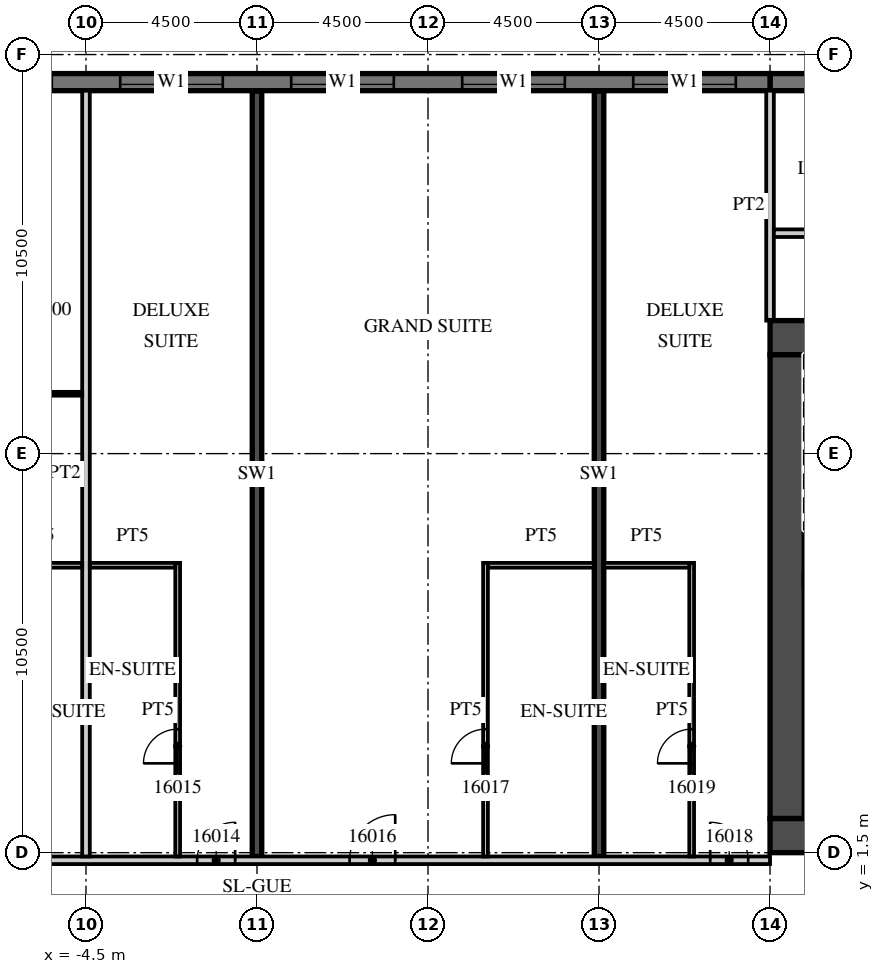
"""IFC4 building model, lengths in metres.
Left out: names, types, materials, properties, quantities, classifications, styles, units other than length and angle.
Written with IfcOpenShell. Run it as: python <this file> out.ifc"""

import sys

from ifc_helpers import new_model, si_unit, direction, frame, frame_2d, origin, place, context, subcontext, project, spatial, rectangle, extrude, element, fill, save


model = new_model("IFC4")
c1 = context("Model", 3, precision=1e-05, world=origin(), true_north=direction((0.0, 1.0)))
c2 = subcontext(c1, "Body", "Model", "MODEL_VIEW")
j1 = project(units=[si_unit("LENGTHUNIT", "METRE"), si_unit("PLANEANGLEUNIT", "RADIAN")], contexts=[c1])
p1 = place(None, origin())
s1 = spatial("IfcSite", under=j1, at=p1, CompositionType="ELEMENT")
p2 = place(p1, origin())
s2 = spatial("IfcBuilding", under=s1, at=p2, CompositionType="ELEMENT")
p3 = place(p2, frame((0.0, 0.0, 83.1)))
s3 = spatial("IfcBuildingStorey", under=s2, at=p3, CompositionType="ELEMENT", Elevation=83.1)
for number, where, z_axis, x_axis in (
    (1, (0.0, 1.4, 0.0), (0.0, 0.0, 1.0), (0.0, 1.0, 0.0)),
    (2, (9.0, 1.4, 0.0), (0.0, 0.0, 1.0), (0.0, 1.0, 0.0)),
):
    element("IfcWall", number, at=place(p3, frame(where, z_axis=z_axis, x_axis=x_axis)), inside=s3, PredefinedType="SHEAR", context=c2, shape_type="SweptSolid", body=[
        extrude(rectangle(XDim=20.14, YDim=0.25, at=frame_2d((10.07, 0.0))), origin(), (0.0, 0.0, 1.0), 3.3),
    ])
p4 = place(p3, frame((31.5, 21.775, 0.0), z_axis=(0.0, 0.0, 1.0), x_axis=(-1.0, 0.0, 0.0)))
e3 = element("IfcWall", 3, at=p4, inside=s3, PredefinedType="SOLIDWALL", context=c2, shape_type="SweptSolid", body=[
    extrude(rectangle(XDim=18.0, YDim=0.45, at=frame_2d((9.0, 0.0))), origin(), (0.0, 0.0, 1.0), 3.02),
])
p5 = place(p3, frame((13.5, 21.775, 0.0), z_axis=(0.0, 0.0, 1.0), x_axis=(-1.0, 0.0, 0.0)))
e4 = element("IfcWall", 4, at=p5, inside=s3, PredefinedType="SOLIDWALL", context=c2, shape_type="SweptSolid", body=[
    extrude(rectangle(XDim=54.5, YDim=0.45, at=frame_2d((27.25, 0.0))), origin(), (0.0, 0.0, 1.0), 3.02),
])
p6 = place(p5, frame((0.9, 0.0, 0.45)))
e5 = element("IfcOpeningElement", 5, at=p6, cuts=e4, PredefinedType="OPENING", context=c2, shape_type="SweptSolid", body=[
    extrude(rectangle(XDim=2.7, YDim=2.25, at=frame_2d((1.35, 1.125))), frame((0.0, 0.235, 0.0), z_axis=(0.0, -1.0, 0.0), x_axis=(1.0, 0.0, 0.0)), (0.0, 0.0, 1.0), 0.47),
])
p7 = place(p5, frame((5.4, 0.0, 0.45)))
e6 = element("IfcOpeningElement", 6, at=p7, cuts=e4, PredefinedType="OPENING", context=c2, shape_type="SweptSolid", body=[
    extrude(rectangle(XDim=2.7, YDim=2.25, at=frame_2d((1.35, 1.125))), frame((0.0, 0.235, 0.0), z_axis=(0.0, -1.0, 0.0), x_axis=(1.0, 0.0, 0.0)), (0.0, 0.0, 1.0), 0.47),
])
p8 = place(p5, frame((9.9, 0.0, 0.45)))
e7 = element("IfcOpeningElement", 7, at=p8, cuts=e4, PredefinedType="OPENING", context=c2, shape_type="SweptSolid", body=[
    extrude(rectangle(XDim=2.7, YDim=2.25, at=frame_2d((1.35, 1.125))), frame((0.0, 0.235, 0.0), z_axis=(0.0, -1.0, 0.0), x_axis=(1.0, 0.0, 0.0)), (0.0, 0.0, 1.0), 0.47),
])
p9 = place(p5, frame((14.4, 0.0, 0.45)))
e8 = element("IfcOpeningElement", 8, at=p9, cuts=e4, PredefinedType="OPENING", context=c2, shape_type="SweptSolid", body=[
    extrude(rectangle(XDim=2.7, YDim=2.25, at=frame_2d((1.35, 1.125))), frame((0.0, 0.235, 0.0), z_axis=(0.0, -1.0, 0.0), x_axis=(1.0, 0.0, 0.0)), (0.0, 0.0, 1.0), 0.47),
])
p10 = place(p5, frame((18.9, 0.0, 0.45)))
e9 = element("IfcOpeningElement", 9, at=p10, cuts=e4, PredefinedType="OPENING", context=c2, shape_type="SweptSolid", body=[
    extrude(rectangle(XDim=2.7, YDim=2.25, at=frame_2d((1.35, 1.125))), frame((0.0, 0.235, 0.0), z_axis=(0.0, -1.0, 0.0), x_axis=(1.0, 0.0, 0.0)), (0.0, 0.0, 1.0), 0.47),
])
p11 = place(p5, frame((23.4, 0.0, 0.45)))
e10 = element("IfcOpeningElement", 10, at=p11, cuts=e4, PredefinedType="OPENING", context=c2, shape_type="SweptSolid", body=[
    extrude(rectangle(XDim=2.7, YDim=2.25, at=frame_2d((1.35, 1.125))), frame((0.0, 0.235, 0.0), z_axis=(0.0, -1.0, 0.0), x_axis=(1.0, 0.0, 0.0)), (0.0, 0.0, 1.0), 0.47),
])
p12 = place(p5, frame((27.9, 0.0, 0.45)))
e11 = element("IfcOpeningElement", 11, at=p12, cuts=e4, PredefinedType="OPENING", context=c2, shape_type="SweptSolid", body=[
    extrude(rectangle(XDim=2.7, YDim=2.25, at=frame_2d((1.35, 1.125))), frame((0.0, 0.235, 0.0), z_axis=(0.0, -1.0, 0.0), x_axis=(1.0, 0.0, 0.0)), (0.0, 0.0, 1.0), 0.47),
])
p13 = place(p5, frame((32.4, 0.0, 0.45)))
e12 = element("IfcOpeningElement", 12, at=p13, cuts=e4, PredefinedType="OPENING", context=c2, shape_type="SweptSolid", body=[
    extrude(rectangle(XDim=2.7, YDim=2.25, at=frame_2d((1.35, 1.125))), frame((0.0, 0.235, 0.0), z_axis=(0.0, -1.0, 0.0), x_axis=(1.0, 0.0, 0.0)), (0.0, 0.0, 1.0), 0.47),
])
p14 = place(p5, frame((36.9, 0.0, 0.45)))
e13 = element("IfcOpeningElement", 13, at=p14, cuts=e4, PredefinedType="OPENING", context=c2, shape_type="SweptSolid", body=[
    extrude(rectangle(XDim=2.7, YDim=2.25, at=frame_2d((1.35, 1.125))), frame((0.0, 0.235, 0.0), z_axis=(0.0, -1.0, 0.0), x_axis=(1.0, 0.0, 0.0)), (0.0, 0.0, 1.0), 0.47),
])
p15 = place(p5, frame((41.4, 0.0, 0.45)))
e14 = element("IfcOpeningElement", 14, at=p15, cuts=e4, PredefinedType="OPENING", context=c2, shape_type="SweptSolid", body=[
    extrude(rectangle(XDim=2.7, YDim=2.25, at=frame_2d((1.35, 1.125))), frame((0.0, 0.235, 0.0), z_axis=(0.0, -1.0, 0.0), x_axis=(1.0, 0.0, 0.0)), (0.0, 0.0, 1.0), 0.47),
])
p16 = place(p5, frame((45.9, 0.0, 0.45)))
e15 = element("IfcOpeningElement", 15, at=p16, cuts=e4, PredefinedType="OPENING", context=c2, shape_type="SweptSolid", body=[
    extrude(rectangle(XDim=2.7, YDim=2.25, at=frame_2d((1.35, 1.125))), frame((0.0, 0.235, 0.0), z_axis=(0.0, -1.0, 0.0), x_axis=(1.0, 0.0, 0.0)), (0.0, 0.0, 1.0), 0.47),
])
p17 = place(p5, frame((50.4, 0.0, 0.45)))
e16 = element("IfcOpeningElement", 16, at=p17, cuts=e4, PredefinedType="OPENING", context=c2, shape_type="SweptSolid", body=[
    extrude(rectangle(XDim=2.7, YDim=2.25, at=frame_2d((1.35, 1.125))), frame((0.0, 0.235, 0.0), z_axis=(0.0, -1.0, 0.0), x_axis=(1.0, 0.0, 0.0)), (0.0, 0.0, 1.0), 0.47),
])
p18 = place(p3, frame((13.5, 15.5, 0.0), z_axis=(0.0, 0.0, 1.0), x_axis=(0.0, 1.0, 0.0)))
e17 = element("IfcWall", 17, at=p18, inside=s3, PredefinedType="PARTITIONING", context=c2, shape_type="SweptSolid", body=[
    extrude(rectangle(XDim=6.05, YDim=0.2, at=frame_2d((3.025, 0.0))), origin(), (0.0, 0.0, 1.0), 3.02),
])
p19 = place(p3, frame((-44.55, 1.3, 0.0), z_axis=(0.0, 0.0, 1.0), x_axis=(1.0, 0.0, 0.0)))
e18 = element("IfcWall", 18, at=p19, inside=s3, PredefinedType="PARTITIONING", context=c2, shape_type="SweptSolid", body=[
    extrude(rectangle(XDim=58.05, YDim=0.2, at=frame_2d((29.025, 0.0))), origin(), (0.0, 0.0, 1.0), 3.02),
])
p20 = place(p19, frame((0.525, 0.0, 0.0)))
e19 = element("IfcOpeningElement", 19, at=p20, cuts=e18, PredefinedType="OPENING", context=c2, shape_type="SweptSolid", body=[
    extrude(rectangle(XDim=1.0, YDim=2.1, at=frame_2d((0.5, 1.05))), frame((0.0, 0.11, 0.0), z_axis=(0.0, -1.0, 0.0), x_axis=(1.0, 0.0, 0.0)), (0.0, 0.0, 1.0), 0.22),
])
p21 = place(p19, frame((4.625, 0.0, 0.0)))
e20 = element("IfcOpeningElement", 20, at=p21, cuts=e18, PredefinedType="OPENING", context=c2, shape_type="SweptSolid", body=[
    extrude(rectangle(XDim=1.0, YDim=2.1, at=frame_2d((0.5, 1.05))), frame((0.0, 0.11, 0.0), z_axis=(0.0, -1.0, 0.0), x_axis=(1.0, 0.0, 0.0)), (0.0, 0.0, 1.0), 0.22),
])
p22 = place(p19, frame((10.987, 0.0, 0.0)))
e21 = element("IfcOpeningElement", 21, at=p22, cuts=e18, PredefinedType="OPENING", context=c2, shape_type="SweptSolid", body=[
    extrude(rectangle(XDim=1.2, YDim=2.1, at=frame_2d((0.6, 1.05))), frame((0.0, 0.11, 0.0), z_axis=(0.0, -1.0, 0.0), x_axis=(1.0, 0.0, 0.0)), (0.0, 0.0, 1.0), 0.22),
])
p23 = place(p19, frame((19.987, 0.0, 0.0)))
e22 = element("IfcOpeningElement", 22, at=p23, cuts=e18, PredefinedType="OPENING", context=c2, shape_type="SweptSolid", body=[
    extrude(rectangle(XDim=1.2, YDim=2.1, at=frame_2d((0.6, 1.05))), frame((0.0, 0.11, 0.0), z_axis=(0.0, -1.0, 0.0), x_axis=(1.0, 0.0, 0.0)), (0.0, 0.0, 1.0), 0.22),
])
p24 = place(p19, frame((28.987, 0.0, 0.0)))
e23 = element("IfcOpeningElement", 23, at=p24, cuts=e18, PredefinedType="OPENING", context=c2, shape_type="SweptSolid", body=[
    extrude(rectangle(XDim=1.2, YDim=2.1, at=frame_2d((0.6, 1.05))), frame((0.0, 0.11, 0.0), z_axis=(0.0, -1.0, 0.0), x_axis=(1.0, 0.0, 0.0)), (0.0, 0.0, 1.0), 0.22),
])
p25 = place(p19, frame((36.125, 0.0, 0.0)))
e24 = element("IfcOpeningElement", 24, at=p25, cuts=e18, PredefinedType="OPENING", context=c2, shape_type="SweptSolid", body=[
    extrude(rectangle(XDim=1.0, YDim=2.1, at=frame_2d((0.5, 1.05))), frame((0.0, 0.11, 0.0), z_axis=(0.0, -1.0, 0.0), x_axis=(1.0, 0.0, 0.0)), (0.0, 0.0, 1.0), 0.22),
])
p26 = place(p19, frame((42.975, 0.0, 0.0)))
e25 = element("IfcOpeningElement", 25, at=p26, cuts=e18, PredefinedType="OPENING", context=c2, shape_type="SweptSolid", body=[
    extrude(rectangle(XDim=1.0, YDim=2.1, at=frame_2d((0.5, 1.05))), frame((0.0, 0.11, 0.0), z_axis=(0.0, -1.0, 0.0), x_axis=(1.0, 0.0, 0.0)), (0.0, 0.0, 1.0), 0.22),
])
p27 = place(p19, frame((46.987, 0.0, 0.0)))
e26 = element("IfcOpeningElement", 26, at=p27, cuts=e18, PredefinedType="OPENING", context=c2, shape_type="SweptSolid", body=[
    extrude(rectangle(XDim=1.2, YDim=2.1, at=frame_2d((0.6, 1.05))), frame((0.0, 0.11, 0.0), z_axis=(0.0, -1.0, 0.0), x_axis=(1.0, 0.0, 0.0)), (0.0, 0.0, 1.0), 0.22),
])
p28 = place(p19, frame((56.475, 0.0, 0.0)))
e27 = element("IfcOpeningElement", 27, at=p28, cuts=e18, PredefinedType="OPENING", context=c2, shape_type="SweptSolid", body=[
    extrude(rectangle(XDim=1.0, YDim=2.1, at=frame_2d((0.5, 1.05))), frame((0.0, 0.11, 0.0), z_axis=(0.0, -1.0, 0.0), x_axis=(1.0, 0.0, 0.0)), (0.0, 0.0, 1.0), 0.22),
])
p29 = place(p3, frame((-4.5, 1.4, 0.0), z_axis=(0.0, 0.0, 1.0), x_axis=(0.0, 1.0, 0.0)))
e28 = element("IfcWall", 28, at=p29, inside=s3, PredefinedType="PARTITIONING", context=c2, shape_type="SweptSolid", body=[
    extrude(rectangle(XDim=20.15, YDim=0.2, at=frame_2d((10.075, 0.0))), origin(), (0.0, 0.0, 1.0), 3.02),
])
p30 = place(p3, frame((-6.85, 9.062, 0.0), z_axis=(0.0, 0.0, 1.0), x_axis=(1.0, 0.0, 0.0)))
e29 = element("IfcWall", 29, at=p30, inside=s3, PredefinedType="PARTITIONING", context=c2, shape_type="SweptSolid", body=[
    extrude(rectangle(XDim=2.25, YDim=0.125, at=frame_2d((1.125, 0.0))), origin(), (0.0, 0.0, 1.0), 3.02),
])
p31 = place(p3, frame((-8.875, 13.575, 0.0), z_axis=(0.0, 0.0, 1.0), x_axis=(1.0, 0.0, 0.0)))
e30 = element("IfcWall", 30, at=p31, inside=s3, PredefinedType="PARTITIONING", context=c2, shape_type="SweptSolid", body=[
    extrude(rectangle(XDim=4.275, YDim=0.1, at=frame_2d((2.137, 0.0))), origin(), (0.0, 0.0, 1.0), 3.02),
])
p32 = place(p31, frame((1.388, 0.0, 0.0)))
e31 = element("IfcOpeningElement", 31, at=p32, cuts=e30, PredefinedType="OPENING", context=c2, shape_type="SweptSolid", body=[
    extrude(rectangle(XDim=1.5, YDim=2.1, at=frame_2d((0.75, 1.05))), frame((0.0, 0.06, 0.0), z_axis=(0.0, -1.0, 0.0), x_axis=(1.0, 0.0, 0.0)), (0.0, 0.0, 1.0), 0.12),
])
p33 = place(p3, frame((-2.087, 1.4, 0.0), z_axis=(0.0, 0.0, 1.0), x_axis=(0.0, 1.0, 0.0)))
e32 = element("IfcWall", 32, at=p33, inside=s3, PredefinedType="PARTITIONING", context=c2, shape_type="SweptSolid", body=[
    extrude(rectangle(XDim=7.725, YDim=0.125, at=frame_2d((3.863, 0.0))), origin(), (0.0, 0.0, 1.0), 3.02),
])
p34 = place(p33, frame((2.45, 0.0, 0.0)))
e33 = element("IfcOpeningElement", 33, at=p34, cuts=e32, PredefinedType="OPENING", context=c2, shape_type="SweptSolid", body=[
    extrude(rectangle(XDim=0.9, YDim=2.1, at=frame_2d((0.45, 1.05))), frame((0.0, 0.073, 0.0), z_axis=(0.0, -1.0, 0.0), x_axis=(1.0, 0.0, 0.0)), (0.0, 0.0, 1.0), 0.145),
])
p35 = place(p3, frame((-4.4, 9.062, 0.0), z_axis=(0.0, 0.0, 1.0), x_axis=(1.0, 0.0, 0.0)))
e34 = element("IfcWall", 34, at=p35, inside=s3, PredefinedType="PARTITIONING", context=c2, shape_type="SweptSolid", body=[
    extrude(rectangle(XDim=2.25, YDim=0.125, at=frame_2d((1.125, 0.0))), origin(), (0.0, 0.0, 1.0), 3.02),
])
p36 = place(p3, frame((6.013, 1.4, 0.0), z_axis=(0.0, 0.0, 1.0), x_axis=(0.0, 1.0, 0.0)))
e35 = element("IfcWall", 35, at=p36, inside=s3, PredefinedType="PARTITIONING", context=c2, shape_type="SweptSolid", body=[
    extrude(rectangle(XDim=7.725, YDim=0.125, at=frame_2d((3.863, 0.0))), origin(), (0.0, 0.0, 1.0), 3.02),
])
p37 = place(p36, frame((2.45, 0.0, 0.0)))
e36 = element("IfcOpeningElement", 36, at=p37, cuts=e35, PredefinedType="OPENING", context=c2, shape_type="SweptSolid", body=[
    extrude(rectangle(XDim=0.9, YDim=2.1, at=frame_2d((0.45, 1.05))), frame((0.0, 0.073, 0.0), z_axis=(0.0, -1.0, 0.0), x_axis=(1.0, 0.0, 0.0)), (0.0, 0.0, 1.0), 0.145),
])
p38 = place(p3, frame((6.075, 9.062, 0.0), z_axis=(0.0, 0.0, 1.0), x_axis=(1.0, 0.0, 0.0)))
e37 = element("IfcWall", 37, at=p38, inside=s3, PredefinedType="PARTITIONING", context=c2, shape_type="SweptSolid", body=[
    extrude(rectangle(XDim=2.8, YDim=0.125, at=frame_2d((1.4, 0.0))), origin(), (0.0, 0.0, 1.0), 3.02),
])
p39 = place(p3, frame((11.438, 1.4, 0.0), z_axis=(0.0, 0.0, 1.0), x_axis=(0.0, 1.0, 0.0)))
e38 = element("IfcWall", 38, at=p39, inside=s3, PredefinedType="PARTITIONING", context=c2, shape_type="SweptSolid", body=[
    extrude(rectangle(XDim=7.725, YDim=0.125, at=frame_2d((3.863, 0.0))), origin(), (0.0, 0.0, 1.0), 3.02),
])
p40 = place(p39, frame((2.45, 0.0, 0.0)))
e39 = element("IfcOpeningElement", 39, at=p40, cuts=e38, PredefinedType="OPENING", context=c2, shape_type="SweptSolid", body=[
    extrude(rectangle(XDim=0.9, YDim=2.1, at=frame_2d((0.45, 1.05))), frame((0.0, 0.073, 0.0), z_axis=(0.0, -1.0, 0.0), x_axis=(1.0, 0.0, 0.0)), (0.0, 0.0, 1.0), 0.145),
])
p41 = place(p3, frame((9.125, 9.062, 0.0), z_axis=(0.0, 0.0, 1.0), x_axis=(1.0, 0.0, 0.0)))
e40 = element("IfcWall", 40, at=p41, inside=s3, PredefinedType="PARTITIONING", context=c2, shape_type="SweptSolid", body=[
    extrude(rectangle(XDim=2.25, YDim=0.125, at=frame_2d((1.125, 0.0))), origin(), (0.0, 0.0, 1.0), 3.02),
])
p42 = place(p3, frame((13.5, 1.95, 0.0), z_axis=(0.0, 0.0, 1.0), x_axis=(1.0, 0.0, 0.0)))
e41 = element("IfcWall", 41, at=p42, inside=s3, PredefinedType="SHEAR", context=c2, shape_type="SweptSolid", body=[
    extrude(rectangle(XDim=18.0, YDim=0.9, at=frame_2d((9.0, 0.0))), origin(), (0.0, 0.0, 1.0), 3.02),
])
p43 = place(p42, frame((1.475, 0.0, 0.0)))
e42 = element("IfcOpeningElement", 42, at=p43, cuts=e41, PredefinedType="OPENING", context=c2, shape_type="SweptSolid", body=[
    extrude(rectangle(XDim=1.8, YDim=2.1, at=frame_2d((0.9, 1.05))), frame((0.0, 0.46, 0.0), z_axis=(0.0, -1.0, 0.0), x_axis=(1.0, 0.0, 0.0)), (0.0, 0.0, 1.0), 0.92),
])
p44 = place(p3, frame((13.5, 15.05, 0.0), z_axis=(0.0, 0.0, 1.0), x_axis=(1.0, 0.0, 0.0)))
e43 = element("IfcWall", 43, at=p44, inside=s3, PredefinedType="SHEAR", context=c2, shape_type="SweptSolid", body=[
    extrude(rectangle(XDim=6.8, YDim=0.9, at=frame_2d((3.4, 0.0))), origin(), (0.0, 0.0, 1.0), 3.02),
])
p45 = place(p44, frame((4.725, 0.0, 0.0)))
e44 = element("IfcOpeningElement", 44, at=p45, cuts=e43, PredefinedType="OPENING", context=c2, shape_type="SweptSolid", body=[
    extrude(rectangle(XDim=1.2, YDim=2.1, at=frame_2d((0.6, 1.05))), frame((0.0, 0.46, 0.0), z_axis=(0.0, -1.0, 0.0), x_axis=(1.0, 0.0, 0.0)), (0.0, 0.0, 1.0), 0.92),
])
p46 = place(p3, frame((13.95, 2.4, 0.0), z_axis=(0.0, 0.0, 1.0), x_axis=(0.0, 1.0, 0.0)))
e45 = element("IfcWall", 45, at=p46, inside=s3, PredefinedType="SHEAR", context=c2, shape_type="SweptSolid", body=[
    extrude(rectangle(XDim=12.2, YDim=0.9, at=frame_2d((6.1, 0.0))), origin(), (0.0, 0.0, 1.0), 3.02),
])
p47 = place(p3, frame((13.6, 17.8, 0.0), z_axis=(0.0, 0.0, 1.0), x_axis=(1.0, 0.0, 0.0)))
e46 = element("IfcWall", 46, at=p47, inside=s3, PredefinedType="PARTITIONING", context=c2, shape_type="SweptSolid", body=[
    extrude(rectangle(XDim=30.95, YDim=0.2, at=frame_2d((15.475, 0.0))), origin(), (0.0, 0.0, 1.0), 3.02),
])
p48 = place(p47, frame((16.613, 0.0, 0.0)))
e47 = element("IfcOpeningElement", 47, at=p48, cuts=e46, PredefinedType="OPENING", context=c2, shape_type="SweptSolid", body=[
    extrude(rectangle(XDim=0.9, YDim=2.1, at=frame_2d((0.45, 1.05))), frame((0.0, 0.11, 0.0), z_axis=(0.0, -1.0, 0.0), x_axis=(1.0, 0.0, 0.0)), (0.0, 0.0, 1.0), 0.22),
])
p49 = place(p47, frame((8.312, 0.0, 0.0)))
e48 = element("IfcOpeningElement", 48, at=p49, cuts=e46, PredefinedType="OPENING", context=c2, shape_type="SweptSolid", body=[
    extrude(rectangle(XDim=0.9, YDim=2.1, at=frame_2d((0.45, 1.05))), frame((0.0, 0.11, 0.0), z_axis=(0.0, -1.0, 0.0), x_axis=(1.0, 0.0, 0.0)), (0.0, 0.0, 1.0), 0.22),
])
p50 = place(p6, origin())
e49 = element("IfcWindow", 49, at=p50, inside=s3, PartitioningType="SINGLE_PANEL", PredefinedType="WINDOW", context=c2, shape_type="SweptSolid", body=[
    extrude(rectangle(XDim=2.7, YDim=2.25, at=frame_2d((1.35, 1.125))), frame((0.0, 0.09, 0.0), z_axis=(0.0, -1.0, 0.0), x_axis=(1.0, 0.0, 0.0)), (0.0, 0.0, 1.0), 0.06),
])
fill(e5, e49)
p51 = place(p7, origin())
e50 = element("IfcWindow", 50, at=p51, inside=s3, PartitioningType="SINGLE_PANEL", PredefinedType="WINDOW", context=c2, shape_type="SweptSolid", body=[
    extrude(rectangle(XDim=2.7, YDim=2.25, at=frame_2d((1.35, 1.125))), frame((0.0, 0.09, 0.0), z_axis=(0.0, -1.0, 0.0), x_axis=(1.0, 0.0, 0.0)), (0.0, 0.0, 1.0), 0.06),
])
fill(e6, e50)
p52 = place(p8, origin())
e51 = element("IfcWindow", 51, at=p52, inside=s3, PartitioningType="SINGLE_PANEL", PredefinedType="WINDOW", context=c2, shape_type="SweptSolid", body=[
    extrude(rectangle(XDim=2.7, YDim=2.25, at=frame_2d((1.35, 1.125))), frame((0.0, 0.09, 0.0), z_axis=(0.0, -1.0, 0.0), x_axis=(1.0, 0.0, 0.0)), (0.0, 0.0, 1.0), 0.06),
])
fill(e7, e51)
p53 = place(p9, origin())
e52 = element("IfcWindow", 52, at=p53, inside=s3, PartitioningType="SINGLE_PANEL", PredefinedType="WINDOW", context=c2, shape_type="SweptSolid", body=[
    extrude(rectangle(XDim=2.7, YDim=2.25, at=frame_2d((1.35, 1.125))), frame((0.0, 0.09, 0.0), z_axis=(0.0, -1.0, 0.0), x_axis=(1.0, 0.0, 0.0)), (0.0, 0.0, 1.0), 0.06),
])
fill(e8, e52)
p54 = place(p26, origin())
e53 = element("IfcDoor", 53, at=p54, inside=s3, OperationType="SINGLE_SWING_RIGHT", PredefinedType="DOOR", context=c2, shape_type="SweptSolid", body=[
    extrude(rectangle(XDim=1.0, YDim=2.1, at=frame_2d((0.5, 1.05))), frame((0.0, 0.025, 0.0), z_axis=(0.0, -1.0, 0.0), x_axis=(1.0, 0.0, 0.0)), (0.0, 0.0, 1.0), 0.05),
])
fill(e25, e53)
p55 = place(p34, origin())
e54 = element("IfcDoor", 54, at=p55, inside=s3, OperationType="SINGLE_SWING_LEFT", PredefinedType="DOOR", context=c2, shape_type="SweptSolid", body=[
    extrude(rectangle(XDim=0.9, YDim=2.1, at=frame_2d((0.45, 1.05))), frame((0.0, 0.025, 0.0), z_axis=(0.0, -1.0, 0.0), x_axis=(1.0, 0.0, 0.0)), (0.0, 0.0, 1.0), 0.05),
])
fill(e33, e54)
p56 = place(p27, origin())
e55 = element("IfcDoor", 55, at=p56, inside=s3, OperationType="SINGLE_SWING_RIGHT", PredefinedType="DOOR", context=c2, shape_type="SweptSolid", body=[
    extrude(rectangle(XDim=1.2, YDim=2.1, at=frame_2d((0.6, 1.05))), frame((0.0, 0.025, 0.0), z_axis=(0.0, -1.0, 0.0), x_axis=(1.0, 0.0, 0.0)), (0.0, 0.0, 1.0), 0.05),
])
fill(e26, e55)
p57 = place(p37, origin())
e56 = element("IfcDoor", 56, at=p57, inside=s3, OperationType="SINGLE_SWING_LEFT", PredefinedType="DOOR", context=c2, shape_type="SweptSolid", body=[
    extrude(rectangle(XDim=0.9, YDim=2.1, at=frame_2d((0.45, 1.05))), frame((0.0, 0.025, 0.0), z_axis=(0.0, -1.0, 0.0), x_axis=(1.0, 0.0, 0.0)), (0.0, 0.0, 1.0), 0.05),
])
fill(e36, e56)
p58 = place(p28, origin())
e57 = element("IfcDoor", 57, at=p58, inside=s3, OperationType="SINGLE_SWING_LEFT", PredefinedType="DOOR", context=c2, shape_type="SweptSolid", body=[
    extrude(rectangle(XDim=1.0, YDim=2.1, at=frame_2d((0.5, 1.05))), frame((0.0, 0.025, 0.0), z_axis=(0.0, -1.0, 0.0), x_axis=(1.0, 0.0, 0.0)), (0.0, 0.0, 1.0), 0.05),
])
fill(e27, e57)
p59 = place(p40, origin())
e58 = element("IfcDoor", 58, at=p59, inside=s3, OperationType="SINGLE_SWING_LEFT", PredefinedType="DOOR", context=c2, shape_type="SweptSolid", body=[
    extrude(rectangle(XDim=0.9, YDim=2.1, at=frame_2d((0.45, 1.05))), frame((0.0, 0.025, 0.0), z_axis=(0.0, -1.0, 0.0), x_axis=(1.0, 0.0, 0.0)), (0.0, 0.0, 1.0), 0.05),
])
fill(e39, e58)
save(model, sys.argv[1])
